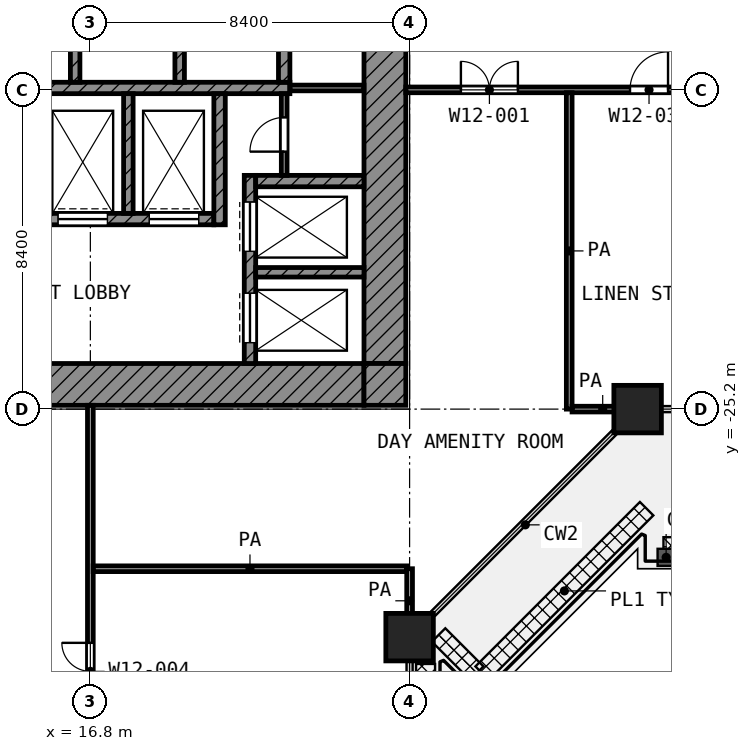
"""IFC4 building model, lengths in metres.
Left out: names, types, materials, properties, quantities, classifications, styles, units other than length and angle.
Written with IfcOpenShell. Run it as: python <this file> out.ifc"""

import sys

from ifc_helpers import new_model, si_unit, direction, frame, frame_2d, origin, origin_2d, place, context, subcontext, project, spatial, rectangle, extrude, element, fill, save


model = new_model("IFC4")
c1 = context("Model", 3, precision=1e-05, world=origin(), true_north=direction((0.0, 1.0)))
c2 = subcontext(c1, "Body", "Model", "MODEL_VIEW")
j1 = project(units=[si_unit("LENGTHUNIT", "METRE"), si_unit("PLANEANGLEUNIT", "RADIAN")], contexts=[c1])
p1 = place(None, origin())
s1 = spatial("IfcSite", under=j1, at=p1, CompositionType="ELEMENT")
p2 = place(p1, origin())
s2 = spatial("IfcBuilding", under=s1, at=p2, CompositionType="ELEMENT")
p3 = place(p2, frame((0.0, 0.0, 77.0)))
s3 = spatial("IfcBuildingStorey", under=s2, at=p3, CompositionType="ELEMENT", Elevation=77.0)
for number, where, z_axis, x_axis in (
    (1, (31.2, -25.2, 0.0), (0.0, 0.0, 1.0), (1.0, 0.0, 0.0)),
    (2, (25.2, -31.2, 0.0), (0.0, 0.0, 1.0), (1.0, 0.0, 0.0)),
):
    element("IfcColumn", number, at=place(p3, frame(where, z_axis=z_axis, x_axis=x_axis)), inside=s3, PredefinedType="COLUMN", context=c2, shape_type="SweptSolid", body=[
        extrude(rectangle(XDim=1.25, YDim=1.25, at=origin_2d()), origin(), (0.0, 0.0, 1.0), 4.2),
    ])
p4 = place(p3, frame((24.55, -24.0, 0.0), z_axis=(0.0, 0.0, 1.0), x_axis=(0.0, 1.0, 0.0)))
e3 = element("IfcWall", 3, at=p4, inside=s3, PredefinedType="SHEAR", context=c2, shape_type="SweptSolid", body=[
    extrude(rectangle(XDim=18.6, YDim=1.1, at=frame_2d((9.3, 0.0))), origin(), (0.0, 0.0, 1.0), 3.9),
])
p5 = place(p4, frame((10.5, 0.0, 0.0)))
e4 = element("IfcOpeningElement", 4, at=p5, cuts=e3, PredefinedType="OPENING", context=c2, shape_type="SweptSolid", body=[
    extrude(rectangle(XDim=1.8, YDim=2.1, at=frame_2d((0.9, 1.05))), frame((0.0, 0.56, 0.0), z_axis=(0.0, -1.0, 0.0), x_axis=(1.0, 0.0, 0.0)), (0.0, 0.0, 1.0), 1.12),
])
p6 = place(p3, frame((5.4, -24.55, 0.0), z_axis=(0.0, 0.0, 1.0), x_axis=(1.0, 0.0, 0.0)))
e5 = element("IfcWall", 5, at=p6, inside=s3, PredefinedType="SHEAR", context=c2, shape_type="SweptSolid", body=[
    extrude(rectangle(XDim=18.6, YDim=1.1, at=frame_2d((9.3, 0.0))), origin(), (0.0, 0.0, 1.0), 3.9),
])
p7 = place(p6, frame((6.3, 0.0, 0.0)))
e6 = element("IfcOpeningElement", 6, at=p7, cuts=e5, PredefinedType="OPENING", context=c2, shape_type="SweptSolid", body=[
    extrude(rectangle(XDim=1.8, YDim=2.1, at=frame_2d((0.9, 1.05))), frame((0.0, 0.56, 0.0), z_axis=(0.0, -1.0, 0.0), x_axis=(1.0, 0.0, 0.0)), (0.0, 0.0, 1.0), 1.12),
])
p8 = place(p3, frame((24.55, -25.1, 0.0), z_axis=(0.0, 0.0, 1.0), x_axis=(0.0, 1.0, 0.0)))
e7 = element("IfcWall", 7, at=p8, inside=s3, PredefinedType="SHEAR", context=c2, shape_type="SweptSolid", body=[
    extrude(rectangle(XDim=1.1, YDim=1.1, at=frame_2d((0.55, 0.0))), origin(), (0.0, 0.0, 1.0), 3.9),
])
p9 = place(p3, frame((5.4, -16.75, 0.0), z_axis=(0.0, 0.0, 1.0), x_axis=(1.0, 0.0, 0.0)))
e8 = element("IfcWall", 8, at=p9, inside=s3, PredefinedType="SHEAR", context=c2, shape_type="SweptSolid", body=[
    extrude(rectangle(XDim=16.65, YDim=0.3, at=frame_2d((8.325, 0.0))), origin(), (0.0, 0.0, 1.0), 3.9),
])
p10 = place(p3, frame((5.4, -20.2, 0.0), z_axis=(0.0, 0.0, 1.0), x_axis=(1.0, 0.0, 0.0)))
e9 = element("IfcWall", 9, at=p10, inside=s3, PredefinedType="SHEAR", context=c2, shape_type="SweptSolid", body=[
    extrude(rectangle(XDim=14.65, YDim=0.3, at=frame_2d((7.325, 0.0))), origin(), (0.0, 0.0, 1.0), 3.9),
])
p11 = place(p10, frame((10.55, 0.0, 0.0)))
e10 = element("IfcOpeningElement", 10, at=p11, cuts=e9, PredefinedType="OPENING", context=c2, shape_type="SweptSolid", body=[
    extrude(rectangle(XDim=1.3, YDim=2.1, at=frame_2d((0.65, 1.05))), frame((0.0, 0.16, 0.0), z_axis=(0.0, -1.0, 0.0), x_axis=(1.0, 0.0, 0.0)), (0.0, 0.0, 1.0), 0.32),
])
p12 = place(p10, frame((12.95, 0.0, 0.0)))
e11 = element("IfcOpeningElement", 11, at=p12, cuts=e9, PredefinedType="OPENING", context=c2, shape_type="SweptSolid", body=[
    extrude(rectangle(XDim=1.3, YDim=2.1, at=frame_2d((0.65, 1.05))), frame((0.0, 0.16, 0.0), z_axis=(0.0, -1.0, 0.0), x_axis=(1.0, 0.0, 0.0)), (0.0, 0.0, 1.0), 0.32),
])
p13 = place(p10, frame((0.55, 0.0, 0.0)))
e12 = element("IfcOpeningElement", 12, at=p13, cuts=e9, PredefinedType="OPENING", context=c2, shape_type="SweptSolid", body=[
    extrude(rectangle(XDim=1.3, YDim=2.1, at=frame_2d((0.65, 1.05))), frame((0.0, 0.16, 0.0), z_axis=(0.0, -1.0, 0.0), x_axis=(1.0, 0.0, 0.0)), (0.0, 0.0, 1.0), 0.32),
])
p14 = place(p10, frame((2.95, 0.0, 0.0)))
e13 = element("IfcOpeningElement", 13, at=p14, cuts=e9, PredefinedType="OPENING", context=c2, shape_type="SweptSolid", body=[
    extrude(rectangle(XDim=1.3, YDim=2.1, at=frame_2d((0.65, 1.05))), frame((0.0, 0.16, 0.0), z_axis=(0.0, -1.0, 0.0), x_axis=(1.0, 0.0, 0.0)), (0.0, 0.0, 1.0), 0.32),
])
p15 = place(p10, frame((7.15, 0.0, 0.0)))
e14 = element("IfcOpeningElement", 14, at=p15, cuts=e9, PredefinedType="OPENING", context=c2, shape_type="SweptSolid", body=[
    extrude(rectangle(XDim=0.9, YDim=2.1, at=frame_2d((0.45, 1.05))), frame((0.0, 0.16, 0.0), z_axis=(0.0, -1.0, 0.0), x_axis=(1.0, 0.0, 0.0)), (0.0, 0.0, 1.0), 0.32),
])
p16 = place(p3, frame((20.2, -20.35, 0.0), z_axis=(0.0, 0.0, 1.0), x_axis=(0.0, 1.0, 0.0)))
e15 = element("IfcWall", 15, at=p16, inside=s3, PredefinedType="SHEAR", context=c2, shape_type="SweptSolid", body=[
    extrude(rectangle(XDim=3.45, YDim=0.3, at=frame_2d((1.725, 0.0))), origin(), (0.0, 0.0, 1.0), 3.9),
])
p17 = place(p3, frame((21.9, -16.6, 0.0), z_axis=(0.0, 0.0, 1.0), x_axis=(0.0, 1.0, 0.0)))
e16 = element("IfcWall", 16, at=p17, inside=s3, PredefinedType="SHEAR", context=c2, shape_type="SweptSolid", body=[
    extrude(rectangle(XDim=2.35, YDim=0.3, at=frame_2d((1.175, 0.0))), origin(), (0.0, 0.0, 1.0), 3.9),
])
p18 = place(p3, frame((21.15, -19.2, 0.0), z_axis=(0.0, 0.0, 1.0), x_axis=(1.0, 0.0, 0.0)))
e17 = element("IfcWall", 17, at=p18, inside=s3, PredefinedType="SHEAR", context=c2, shape_type="SweptSolid", body=[
    extrude(rectangle(XDim=2.85, YDim=0.3, at=frame_2d((1.425, 0.0))), origin(), (0.0, 0.0, 1.0), 3.9),
])
p19 = place(p3, frame((21.0, -24.0, 0.0), z_axis=(0.0, 0.0, 1.0), x_axis=(0.0, 1.0, 0.0)))
e18 = element("IfcWall", 18, at=p19, inside=s3, PredefinedType="SHEAR", context=c2, shape_type="SweptSolid", body=[
    extrude(rectangle(XDim=4.95, YDim=0.3, at=frame_2d((2.475, 0.0))), origin(), (0.0, 0.0, 1.0), 3.9),
])
p20 = place(p19, frame((2.95, 0.0, 0.0)))
e19 = element("IfcOpeningElement", 19, at=p20, cuts=e18, PredefinedType="OPENING", context=c2, shape_type="SweptSolid", body=[
    extrude(rectangle(XDim=1.3, YDim=2.1, at=frame_2d((0.65, 1.05))), frame((0.0, 0.16, 0.0), z_axis=(0.0, -1.0, 0.0), x_axis=(1.0, 0.0, 0.0)), (0.0, 0.0, 1.0), 0.32),
])
p21 = place(p19, frame((0.55, 0.0, 0.0)))
e20 = element("IfcOpeningElement", 20, at=p21, cuts=e18, PredefinedType="OPENING", context=c2, shape_type="SweptSolid", body=[
    extrude(rectangle(XDim=1.3, YDim=2.1, at=frame_2d((0.65, 1.05))), frame((0.0, 0.16, 0.0), z_axis=(0.0, -1.0, 0.0), x_axis=(1.0, 0.0, 0.0)), (0.0, 0.0, 1.0), 0.32),
])
p22 = place(p3, frame((21.15, -21.6, 0.0), z_axis=(0.0, 0.0, 1.0), x_axis=(1.0, 0.0, 0.0)))
e21 = element("IfcWall", 21, at=p22, inside=s3, PredefinedType="SHEAR", context=c2, shape_type="SweptSolid", body=[
    extrude(rectangle(XDim=2.85, YDim=0.25, at=frame_2d((1.425, 0.0))), origin(), (0.0, 0.0, 1.0), 3.9),
])
p23 = place(p3, frame((17.8, -20.05, 0.0), z_axis=(0.0, 0.0, 1.0), x_axis=(0.0, 1.0, 0.0)))
e22 = element("IfcWall", 22, at=p23, inside=s3, PredefinedType="SHEAR", context=c2, shape_type="SweptSolid", body=[
    extrude(rectangle(XDim=3.15, YDim=0.25, at=frame_2d((1.575, 0.0))), origin(), (0.0, 0.0, 1.0), 3.9),
])
for number, where, z_axis, x_axis in (
    (23, (16.4, -16.6, 0.0), (0.0, 0.0, 1.0), (0.0, 1.0, 0.0)),
    (24, (19.15, -16.6, 0.0), (0.0, 0.0, 1.0), (0.0, 1.0, 0.0)),
):
    element("IfcWall", number, at=place(p3, frame(where, z_axis=z_axis, x_axis=x_axis)), inside=s3, PredefinedType="SHEAR", context=c2, shape_type="SweptSolid", body=[
        extrude(rectangle(XDim=2.35, YDim=0.25, at=frame_2d((1.175, 0.0))), origin(), (0.0, 0.0, 1.0), 3.9),
    ])
p24 = place(p3, frame((21.9, -19.05, 0.0), z_axis=(0.0, 0.0, 1.0), x_axis=(0.0, 1.0, 0.0)))
e25 = element("IfcWall", 25, at=p24, inside=s3, PredefinedType="PARTITIONING", context=c2, shape_type="SweptSolid", body=[
    extrude(rectangle(XDim=2.15, YDim=0.15, at=frame_2d((1.075, 0.0))), origin(), (0.0, 0.0, 1.0), 3.9),
])
p25 = place(p24, frame((0.625, 0.0, 0.0)))
e26 = element("IfcOpeningElement", 26, at=p25, cuts=e25, PredefinedType="OPENING", context=c2, shape_type="SweptSolid", body=[
    extrude(rectangle(XDim=0.9, YDim=2.1, at=frame_2d((0.45, 1.05))), frame((0.0, 0.085, 0.0), z_axis=(0.0, -1.0, 0.0), x_axis=(1.0, 0.0, 0.0)), (0.0, 0.0, 1.0), 0.17),
])
p26 = place(p3, frame((22.05, -16.75, 0.0), z_axis=(0.0, 0.0, 1.0), x_axis=(1.0, 0.0, 0.0)))
e27 = element("IfcWall", 27, at=p26, inside=s3, PredefinedType="PARTITIONING", context=c2, shape_type="SweptSolid", body=[
    extrude(rectangle(XDim=1.95, YDim=0.15, at=frame_2d((0.975, 0.0))), origin(), (0.0, 0.0, 1.0), 3.9),
])
p27 = place(p3, frame((16.875, -29.4, 0.0), z_axis=(0.0, 0.0, 1.0), x_axis=(1.0, 0.0, 0.0)))
e28 = element("IfcWall", 28, at=p27, inside=s3, PredefinedType="PARTITIONING", context=c2, shape_type="SweptSolid", body=[
    extrude(rectangle(XDim=8.25, YDim=0.15, at=frame_2d((4.125, 0.0))), origin(), (0.0, 0.0, 1.0), 3.9),
])
p28 = place(p3, frame((29.475, -25.2, 0.0), z_axis=(0.0, 0.0, 1.0), x_axis=(1.0, 0.0, 0.0)))
e29 = element("IfcWall", 29, at=p28, inside=s3, PredefinedType="PARTITIONING", context=c2, shape_type="SweptSolid", body=[
    extrude(rectangle(XDim=1.612, YDim=0.15, at=frame_2d((0.806, 0.0))), origin(), (0.0, 0.0, 1.0), 3.9),
])
p29 = place(p3, frame((25.1, -16.8, 0.0), z_axis=(0.0, 0.0, 1.0), x_axis=(1.0, 0.0, 0.0)))
e30 = element("IfcWall", 30, at=p29, inside=s3, PredefinedType="PARTITIONING", context=c2, shape_type="SweptSolid", body=[
    extrude(rectangle(XDim=54.62, YDim=0.15, at=frame_2d((27.31, 0.0))), origin(), (0.0, 0.0, 1.0), 3.9),
])
p30 = place(p29, frame((1.45, 0.0, 0.0)))
e31 = element("IfcOpeningElement", 31, at=p30, cuts=e30, PredefinedType="OPENING", context=c2, shape_type="SweptSolid", body=[
    extrude(rectangle(XDim=1.5, YDim=2.1, at=frame_2d((0.75, 1.05))), frame((0.0, 0.085, 0.0), z_axis=(0.0, -1.0, 0.0), x_axis=(1.0, 0.0, 0.0)), (0.0, 0.0, 1.0), 0.17),
])
p31 = place(p29, frame((5.9, 0.0, 0.0)))
e32 = element("IfcOpeningElement", 32, at=p31, cuts=e30, PredefinedType="OPENING", context=c2, shape_type="SweptSolid", body=[
    extrude(rectangle(XDim=1.0, YDim=2.1, at=frame_2d((0.5, 1.05))), frame((0.0, 0.085, 0.0), z_axis=(0.0, -1.0, 0.0), x_axis=(1.0, 0.0, 0.0)), (0.0, 0.0, 1.0), 0.17),
])
p32 = place(p29, frame((10.0, 0.0, 0.0)))
e33 = element("IfcOpeningElement", 33, at=p32, cuts=e30, PredefinedType="OPENING", context=c2, shape_type="SweptSolid", body=[
    extrude(rectangle(XDim=1.2, YDim=2.1, at=frame_2d((0.6, 1.05))), frame((0.0, 0.085, 0.0), z_axis=(0.0, -1.0, 0.0), x_axis=(1.0, 0.0, 0.0)), (0.0, 0.0, 1.0), 0.17),
])
p33 = place(p29, frame((15.0, 0.0, 0.0)))
e34 = element("IfcOpeningElement", 34, at=p33, cuts=e30, PredefinedType="OPENING", context=c2, shape_type="SweptSolid", body=[
    extrude(rectangle(XDim=1.2, YDim=2.1, at=frame_2d((0.6, 1.05))), frame((0.0, 0.085, 0.0), z_axis=(0.0, -1.0, 0.0), x_axis=(1.0, 0.0, 0.0)), (0.0, 0.0, 1.0), 0.17),
])
p34 = place(p29, frame((18.1, 0.0, 0.0)))
e35 = element("IfcOpeningElement", 35, at=p34, cuts=e30, PredefinedType="OPENING", context=c2, shape_type="SweptSolid", body=[
    extrude(rectangle(XDim=1.2, YDim=2.1, at=frame_2d((0.6, 1.05))), frame((0.0, 0.085, 0.0), z_axis=(0.0, -1.0, 0.0), x_axis=(1.0, 0.0, 0.0)), (0.0, 0.0, 1.0), 0.17),
])
p35 = place(p29, frame((23.4, 0.0, 0.0)))
e36 = element("IfcOpeningElement", 36, at=p35, cuts=e30, PredefinedType="OPENING", context=c2, shape_type="SweptSolid", body=[
    extrude(rectangle(XDim=1.2, YDim=2.1, at=frame_2d((0.6, 1.05))), frame((0.0, 0.085, 0.0), z_axis=(0.0, -1.0, 0.0), x_axis=(1.0, 0.0, 0.0)), (0.0, 0.0, 1.0), 0.17),
])
p36 = place(p29, frame((21.95, 0.0, 0.0)))
e37 = element("IfcOpeningElement", 37, at=p36, cuts=e30, PredefinedType="OPENING", context=c2, shape_type="SweptSolid", body=[
    extrude(rectangle(XDim=1.1, YDim=2.1, at=frame_2d((0.55, 1.05))), frame((0.0, 0.085, 0.0), z_axis=(0.0, -1.0, 0.0), x_axis=(1.0, 0.0, 0.0)), (0.0, 0.0, 1.0), 0.17),
])
p37 = place(p29, frame((31.8, 0.0, 0.0)))
e38 = element("IfcOpeningElement", 38, at=p37, cuts=e30, PredefinedType="OPENING", context=c2, shape_type="SweptSolid", body=[
    extrude(rectangle(XDim=1.2, YDim=2.1, at=frame_2d((0.6, 1.05))), frame((0.0, 0.085, 0.0), z_axis=(0.0, -1.0, 0.0), x_axis=(1.0, 0.0, 0.0)), (0.0, 0.0, 1.0), 0.17),
])
p38 = place(p29, frame((34.7, 0.0, 0.0)))
e39 = element("IfcOpeningElement", 39, at=p38, cuts=e30, PredefinedType="OPENING", context=c2, shape_type="SweptSolid", body=[
    extrude(rectangle(XDim=1.2, YDim=2.1, at=frame_2d((0.6, 1.05))), frame((0.0, 0.085, 0.0), z_axis=(0.0, -1.0, 0.0), x_axis=(1.0, 0.0, 0.0)), (0.0, 0.0, 1.0), 0.17),
])
p39 = place(p29, frame((43.3, 0.0, 0.0)))
e40 = element("IfcOpeningElement", 40, at=p39, cuts=e30, PredefinedType="OPENING", context=c2, shape_type="SweptSolid", body=[
    extrude(rectangle(XDim=1.2, YDim=2.1, at=frame_2d((0.6, 1.05))), frame((0.0, 0.085, 0.0), z_axis=(0.0, -1.0, 0.0), x_axis=(1.0, 0.0, 0.0)), (0.0, 0.0, 1.0), 0.17),
])
p40 = place(p29, frame((40.5, 0.0, 0.0)))
e41 = element("IfcOpeningElement", 41, at=p40, cuts=e30, PredefinedType="OPENING", context=c2, shape_type="SweptSolid", body=[
    extrude(rectangle(XDim=0.9, YDim=2.1, at=frame_2d((0.45, 1.05))), frame((0.0, 0.085, 0.0), z_axis=(0.0, -1.0, 0.0), x_axis=(1.0, 0.0, 0.0)), (0.0, 0.0, 1.0), 0.17),
])
p41 = place(p29, frame((48.25, 0.0, 0.0)))
e42 = element("IfcOpeningElement", 42, at=p41, cuts=e30, PredefinedType="OPENING", context=c2, shape_type="SweptSolid", body=[
    extrude(rectangle(XDim=1.5, YDim=2.1, at=frame_2d((0.75, 1.05))), frame((0.0, 0.085, 0.0), z_axis=(0.0, -1.0, 0.0), x_axis=(1.0, 0.0, 0.0)), (0.0, 0.0, 1.0), 0.17),
])
p42 = place(p3, frame((16.8, -41.35, 0.0), z_axis=(0.0, 0.0, 1.0), x_axis=(0.0, 1.0, 0.0)))
e43 = element("IfcWall", 43, at=p42, inside=s3, PredefinedType="PARTITIONING", context=c2, shape_type="SweptSolid", body=[
    extrude(rectangle(XDim=16.25, YDim=0.15, at=frame_2d((8.125, 0.0))), origin(), (0.0, 0.0, 1.0), 3.9),
])
p43 = place(p42, frame((8.5, 0.0, 0.0)))
e44 = element("IfcOpeningElement", 44, at=p43, cuts=e43, PredefinedType="OPENING", context=c2, shape_type="SweptSolid", body=[
    extrude(rectangle(XDim=1.5, YDim=2.1, at=frame_2d((0.75, 1.05))), frame((0.0, 0.085, 0.0), z_axis=(0.0, -1.0, 0.0), x_axis=(1.0, 0.0, 0.0)), (0.0, 0.0, 1.0), 0.17),
])
p44 = place(p42, frame((0.35, 0.0, 0.0)))
e45 = element("IfcOpeningElement", 45, at=p44, cuts=e43, PredefinedType="OPENING", context=c2, shape_type="SweptSolid", body=[
    extrude(rectangle(XDim=0.9, YDim=2.1, at=frame_2d((0.45, 1.05))), frame((0.0, 0.085, 0.0), z_axis=(0.0, -1.0, 0.0), x_axis=(1.0, 0.0, 0.0)), (0.0, 0.0, 1.0), 0.17),
])
p45 = place(p3, frame((25.2, -31.087, 0.0), z_axis=(0.0, 0.0, 1.0), x_axis=(0.0, 1.0, 0.0)))
e46 = element("IfcWall", 46, at=p45, inside=s3, PredefinedType="PARTITIONING", context=c2, shape_type="SweptSolid", body=[
    extrude(rectangle(XDim=1.687, YDim=0.15, at=frame_2d((0.844, 0.0))), origin(), (0.0, 0.0, 1.0), 3.9),
])
p46 = place(p3, frame((29.4, -25.2, 0.0), z_axis=(0.0, 0.0, 1.0), x_axis=(0.0, 1.0, 0.0)))
e47 = element("IfcWall", 47, at=p46, inside=s3, PredefinedType="PARTITIONING", context=c2, shape_type="SweptSolid", body=[
    extrude(rectangle(XDim=8.325, YDim=0.15, at=frame_2d((4.163, 0.0))), origin(), (0.0, 0.0, 1.0), 3.9),
])
p47 = place(p20, origin())
e48 = element("IfcDoor", 48, at=p47, inside=s3, OperationType="DOUBLE_DOOR_SLIDING", PredefinedType="DOOR", context=c2, shape_type="SweptSolid", body=[
    extrude(rectangle(XDim=1.3, YDim=2.1, at=frame_2d((0.65, 1.05))), frame((0.0, 0.025, 0.0), z_axis=(0.0, -1.0, 0.0), x_axis=(1.0, 0.0, 0.0)), (0.0, 0.0, 1.0), 0.05),
])
fill(e19, e48)
p48 = place(p21, origin())
e49 = element("IfcDoor", 49, at=p48, inside=s3, OperationType="DOUBLE_DOOR_SLIDING", PredefinedType="DOOR", context=c2, shape_type="SweptSolid", body=[
    extrude(rectangle(XDim=1.3, YDim=2.1, at=frame_2d((0.65, 1.05))), frame((0.0, 0.025, 0.0), z_axis=(0.0, -1.0, 0.0), x_axis=(1.0, 0.0, 0.0)), (0.0, 0.0, 1.0), 0.05),
])
fill(e20, e49)
p49 = place(p11, origin())
e50 = element("IfcDoor", 50, at=p49, inside=s3, OperationType="DOUBLE_DOOR_SLIDING", PredefinedType="DOOR", context=c2, shape_type="SweptSolid", body=[
    extrude(rectangle(XDim=1.3, YDim=2.1, at=frame_2d((0.65, 1.05))), frame((0.0, 0.025, 0.0), z_axis=(0.0, -1.0, 0.0), x_axis=(1.0, 0.0, 0.0)), (0.0, 0.0, 1.0), 0.05),
])
fill(e10, e50)
p50 = place(p12, origin())
e51 = element("IfcDoor", 51, at=p50, inside=s3, OperationType="DOUBLE_DOOR_SLIDING", PredefinedType="DOOR", context=c2, shape_type="SweptSolid", body=[
    extrude(rectangle(XDim=1.3, YDim=2.1, at=frame_2d((0.65, 1.05))), frame((0.0, 0.025, 0.0), z_axis=(0.0, -1.0, 0.0), x_axis=(1.0, 0.0, 0.0)), (0.0, 0.0, 1.0), 0.05),
])
fill(e11, e51)
p51 = place(p25, origin())
e52 = element("IfcDoor", 52, at=p51, inside=s3, OperationType="SINGLE_SWING_LEFT", PredefinedType="DOOR", context=c2, shape_type="SweptSolid", body=[
    extrude(rectangle(XDim=0.9, YDim=2.1, at=frame_2d((0.45, 1.05))), frame((0.0, 0.025, 0.0), z_axis=(0.0, -1.0, 0.0), x_axis=(1.0, 0.0, 0.0)), (0.0, 0.0, 1.0), 0.05),
])
fill(e26, e52)
p52 = place(p30, origin())
e53 = element("IfcDoor", 53, at=p52, inside=s3, OperationType="DOUBLE_DOOR_SINGLE_SWING", PredefinedType="DOOR", context=c2, shape_type="SweptSolid", body=[
    extrude(rectangle(XDim=1.5, YDim=2.1, at=frame_2d((0.75, 1.05))), frame((0.0, 0.025, 0.0), z_axis=(0.0, -1.0, 0.0), x_axis=(1.0, 0.0, 0.0)), (0.0, 0.0, 1.0), 0.05),
])
fill(e31, e53)
p53 = place(p31, origin())
e54 = element("IfcDoor", 54, at=p53, inside=s3, OperationType="SINGLE_SWING_RIGHT", PredefinedType="DOOR", context=c2, shape_type="SweptSolid", body=[
    extrude(rectangle(XDim=1.0, YDim=2.1, at=frame_2d((0.5, 1.05))), frame((0.0, 0.025, 0.0), z_axis=(0.0, -1.0, 0.0), x_axis=(1.0, 0.0, 0.0)), (0.0, 0.0, 1.0), 0.05),
])
fill(e32, e54)
p54 = place(p43, origin())
e55 = element("IfcDoor", 55, at=p54, inside=s3, OperationType="DOUBLE_DOOR_SINGLE_SWING", PredefinedType="DOOR", context=c2, shape_type="SweptSolid", body=[
    extrude(rectangle(XDim=1.5, YDim=2.1, at=frame_2d((0.75, 1.05))), frame((0.0, 0.025, 0.0), z_axis=(0.0, -1.0, 0.0), x_axis=(1.0, 0.0, 0.0)), (0.0, 0.0, 1.0), 0.05),
])
fill(e44, e55)
save(model, sys.argv[1])
